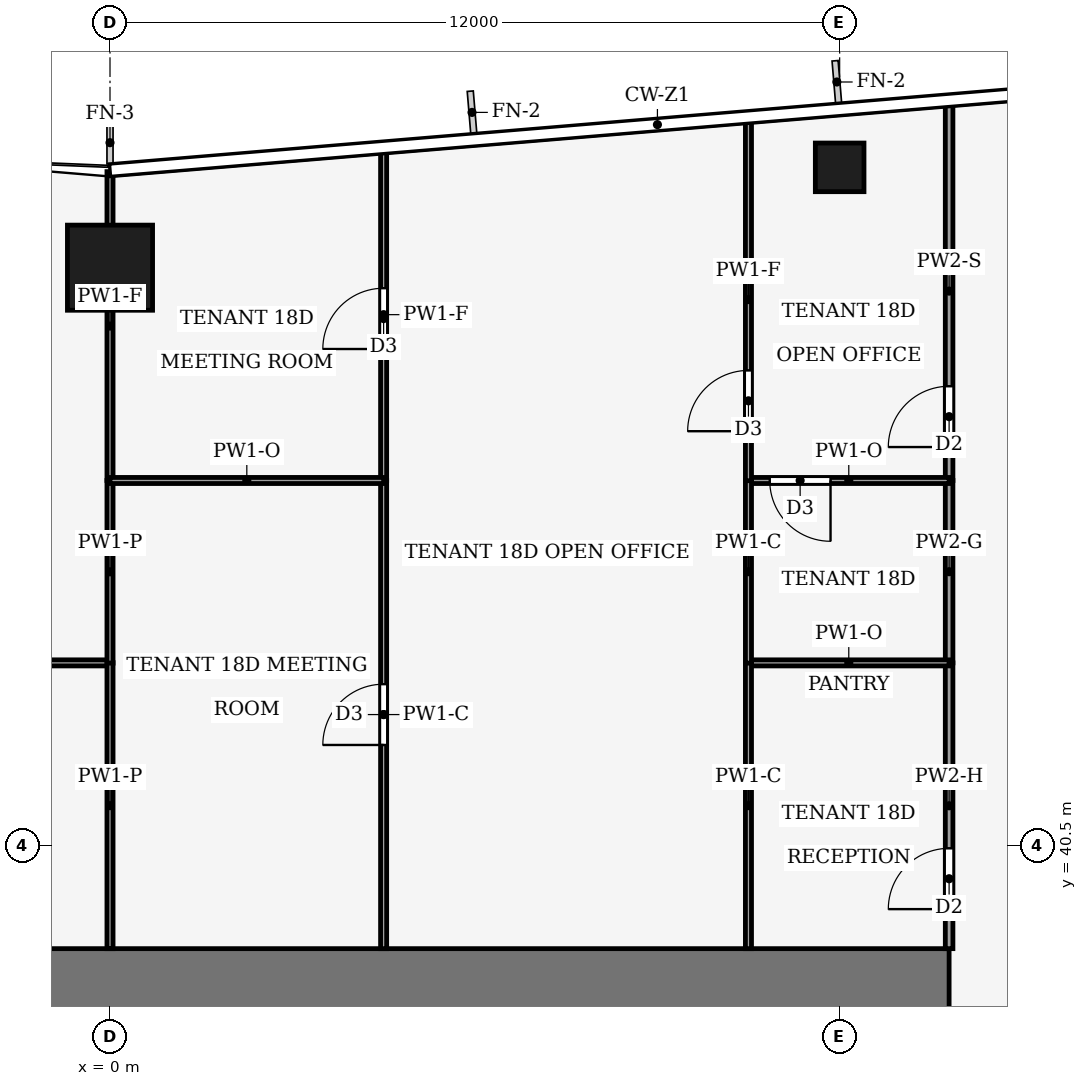
"""IFC4 building model, lengths in metres.
Left out: names, types, materials, properties, quantities, classifications, styles, units other than length and angle.
Written with IfcOpenShell. Run it as: python <this file> out.ifc"""

import sys

from ifc_helpers import new_model, si_unit, direction, frame, frame_2d, origin, origin_2d, place, context, subcontext, project, spatial, rectangle, hollow_rectangle, extrude, element, fill, save


model = new_model("IFC4")
c1 = context("Model", 3, precision=1e-05, world=origin(), true_north=direction((0.0, 1.0)))
c2 = subcontext(c1, "Body", "Model", "MODEL_VIEW")
j1 = project(units=[si_unit("LENGTHUNIT", "METRE"), si_unit("PLANEANGLEUNIT", "RADIAN")], contexts=[c1])
p1 = place(None, origin())
s1 = spatial("IfcSite", under=j1, at=p1, CompositionType="ELEMENT")
p2 = place(p1, origin())
s2 = spatial("IfcBuilding", under=s1, at=p2, CompositionType="ELEMENT")
p3 = place(p2, frame((0.0, 0.0, 82.0)))
s3 = spatial("IfcBuildingStorey", under=s2, at=p3, CompositionType="ELEMENT", Elevation=82.0)
p4 = place(p3, frame((-13.8, 38.2, -0.13), z_axis=(0.0, 0.0, 1.0), x_axis=(1.0, 0.0, 0.0)))
e1 = element("IfcWall", 1, at=p4, inside=s3, PredefinedType="SHEAR", context=c2, shape_type="SweptSolid", body=[
    extrude(rectangle(XDim=27.6, YDim=1.2, at=frame_2d((13.8, 0.0))), origin(), (0.0, 0.0, 1.0), 4.0),
])
p5 = place(p3, frame((0.0, 50.0, 0.0), z_axis=(0.0, 0.0, 1.0), x_axis=(1.0, 0.0, 0.0)))
e2 = element("IfcColumn", 2, at=p5, inside=s3, PredefinedType="COLUMN", context=c2, shape_type="SweptSolid", body=[
    extrude(hollow_rectangle(XDim=1.4, YDim=1.4, WallThickness=0.08, at=origin_2d()), origin(), (0.0, 0.0, 1.0), 4.0),
])
p6 = place(p3, frame((12.0, 51.65, 0.0), z_axis=(0.0, 0.0, 1.0), x_axis=(1.0, 0.0, 0.0)))
e3 = element("IfcColumn", 3, at=p6, inside=s3, PredefinedType="COLUMN", context=c2, shape_type="SweptSolid", body=[
    extrude(hollow_rectangle(XDim=0.8, YDim=0.8, WallThickness=0.04, at=origin_2d()), origin(), (0.0, 0.0, 1.0), 4.0),
])
p7 = place(p3, frame((13.8, 38.8, 0.0), z_axis=(0.0, 0.0, 1.0), x_axis=(0.0, 1.0, 0.0)))
e4 = element("IfcWall", 4, at=p7, inside=s3, PredefinedType="PARTITIONING", context=c2, shape_type="SweptSolid", body=[
    extrude(rectangle(XDim=4.7, YDim=0.125, at=frame_2d((2.35, 0.0))), origin(), (0.0, 0.0, 1.0), 3.14),
])
p8 = place(p7, frame((0.65, 0.0, 0.0)))
e5 = element("IfcOpeningElement", 5, at=p8, cuts=e4, PredefinedType="OPENING", context=c2, shape_type="SweptSolid", body=[
    extrude(rectangle(XDim=1.0, YDim=2.1, at=frame_2d((0.5, 1.05))), frame((0.0, 0.073, 0.0), z_axis=(0.0, -1.0, 0.0), x_axis=(1.0, 0.0, 0.0)), (0.0, 0.0, 1.0), 0.145),
])
p9 = place(p3, frame((13.8, 46.5, 0.0), z_axis=(0.0, 0.0, 1.0), x_axis=(0.0, -1.0, 0.0)))
e6 = element("IfcWall", 6, at=p9, inside=s3, PredefinedType="PARTITIONING", context=c2, shape_type="SweptSolid", body=[
    extrude(rectangle(XDim=3.0, YDim=0.125, at=frame_2d((1.5, 0.0))), origin(), (0.0, 0.0, 1.0), 3.87),
])
p10 = place(p3, frame((13.8, 46.5, 0.0), z_axis=(0.0, 0.0, 1.0), x_axis=(0.0, 1.0, 0.0)))
e7 = element("IfcWall", 7, at=p10, inside=s3, PredefinedType="PARTITIONING", context=c2, shape_type="SweptSolid", body=[
    extrude(rectangle(XDim=6.23, YDim=0.125, at=frame_2d((3.115, 0.0))), origin(), (0.0, 0.0, 1.0), 3.04),
])
p11 = place(p10, frame((0.55, 0.0, 0.0)))
e8 = element("IfcOpeningElement", 8, at=p11, cuts=e7, PredefinedType="OPENING", context=c2, shape_type="SweptSolid", body=[
    extrude(rectangle(XDim=1.0, YDim=2.1, at=frame_2d((0.5, 1.05))), frame((0.0, 0.073, 0.0), z_axis=(0.0, -1.0, 0.0), x_axis=(1.0, 0.0, 0.0)), (0.0, 0.0, 1.0), 0.145),
])
p12 = place(p3, frame((0.0, 43.5, 0.0), z_axis=(0.0, 0.0, 1.0), x_axis=(-1.0, 0.0, 0.0)))
e9 = element("IfcWall", 9, at=p12, inside=s3, PredefinedType="PARTITIONING", context=c2, shape_type="SweptSolid", body=[
    extrude(rectangle(XDim=10.5, YDim=0.1, at=frame_2d((5.25, 0.0))), origin(), (0.0, 0.0, 1.0), 3.39),
])
p13 = place(p12, frame((4.75, 0.0, 0.0)))
e10 = element("IfcOpeningElement", 10, at=p13, cuts=e9, PredefinedType="OPENING", context=c2, shape_type="SweptSolid", body=[
    extrude(rectangle(XDim=1.0, YDim=2.1, at=frame_2d((0.5, 1.05))), frame((0.0, 0.06, 0.0), z_axis=(0.0, -1.0, 0.0), x_axis=(1.0, 0.0, 0.0)), (0.0, 0.0, 1.0), 0.12),
])
p14 = place(p3, frame((0.0, 38.8, 0.0), z_axis=(0.0, 0.0, 1.0), x_axis=(0.0, 1.0, 0.0)))
e11 = element("IfcWall", 11, at=p14, inside=s3, PredefinedType="PARTITIONING", context=c2, shape_type="SweptSolid", body=[
    extrude(rectangle(XDim=4.704, YDim=0.1, at=frame_2d((2.352, 0.0))), origin(), (0.0, 0.0, 1.0), 3.44),
])
p15 = place(p3, frame((0.0, 43.496, 0.0), z_axis=(0.0, 0.0, 1.0), x_axis=(0.0, 1.0, 0.0)))
e12 = element("IfcWall", 12, at=p15, inside=s3, PredefinedType="PARTITIONING", context=c2, shape_type="SweptSolid", body=[
    extrude(rectangle(XDim=3.004, YDim=0.1, at=frame_2d((1.502, 0.0))), origin(), (0.0, 0.0, 1.0), 3.44),
])
p16 = place(p3, frame((0.0, 46.5, 0.0), z_axis=(0.0, 0.0, 1.0), x_axis=(0.0, 1.0, 0.0)))
e13 = element("IfcWall", 13, at=p16, inside=s3, PredefinedType="PARTITIONING", context=c2, shape_type="SweptSolid", body=[
    extrude(rectangle(XDim=5.08, YDim=0.1, at=frame_2d((2.54, 0.0))), origin(), (0.0, 0.0, 1.0), 3.04),
])
p17 = place(p3, frame((13.8, 43.5, 0.0), z_axis=(0.0, 0.0, 1.0), x_axis=(-1.0, 0.0, 0.0)))
e14 = element("IfcWall", 14, at=p17, inside=s3, PredefinedType="PARTITIONING", context=c2, shape_type="SweptSolid", body=[
    extrude(rectangle(XDim=3.3, YDim=0.1, at=frame_2d((1.65, 0.0))), origin(), (0.0, 0.0, 1.0), 3.39),
])
p18 = place(p3, frame((10.5, 43.504, 0.0), z_axis=(0.0, 0.0, 1.0), x_axis=(0.0, -1.0, 0.0)))
e15 = element("IfcWall", 15, at=p18, inside=s3, PredefinedType="PARTITIONING", context=c2, shape_type="SweptSolid", body=[
    extrude(rectangle(XDim=4.704, YDim=0.1, at=frame_2d((2.352, 0.0))), origin(), (0.0, 0.0, 1.0), 3.87),
])
p19 = place(p3, frame((13.8, 46.5, 0.0), z_axis=(0.0, 0.0, 1.0), x_axis=(-1.0, 0.0, 0.0)))
e16 = element("IfcWall", 16, at=p19, inside=s3, PredefinedType="PARTITIONING", context=c2, shape_type="SweptSolid", body=[
    extrude(rectangle(XDim=3.3, YDim=0.1, at=frame_2d((1.65, 0.0))), origin(), (0.0, 0.0, 1.0), 3.39),
])
p20 = place(p19, frame((1.95, 0.0, 0.0)))
e17 = element("IfcOpeningElement", 17, at=p20, cuts=e16, PredefinedType="OPENING", context=c2, shape_type="SweptSolid", body=[
    extrude(rectangle(XDim=1.0, YDim=2.1, at=frame_2d((0.5, 1.05))), frame((0.0, 0.06, 0.0), z_axis=(0.0, -1.0, 0.0), x_axis=(1.0, 0.0, 0.0)), (0.0, 0.0, 1.0), 0.12),
])
p21 = place(p3, frame((10.5, 46.504, 0.0), z_axis=(0.0, 0.0, 1.0), x_axis=(0.0, -1.0, 0.0)))
e18 = element("IfcWall", 18, at=p21, inside=s3, PredefinedType="PARTITIONING", context=c2, shape_type="SweptSolid", body=[
    extrude(rectangle(XDim=3.008, YDim=0.1, at=frame_2d((1.504, 0.0))), origin(), (0.0, 0.0, 1.0), 3.87),
])
p22 = place(p3, frame((10.5, 46.496, 0.0), z_axis=(0.0, 0.0, 1.0), x_axis=(0.0, 1.0, 0.0)))
e19 = element("IfcWall", 19, at=p22, inside=s3, PredefinedType="PARTITIONING", context=c2, shape_type="SweptSolid", body=[
    extrude(rectangle(XDim=5.959, YDim=0.1, at=frame_2d((2.979, 0.0))), origin(), (0.0, 0.0, 1.0), 3.04),
])
p23 = place(p22, frame((0.814, 0.0, 0.0)))
e20 = element("IfcOpeningElement", 20, at=p23, cuts=e19, PredefinedType="OPENING", context=c2, shape_type="SweptSolid", body=[
    extrude(rectangle(XDim=1.0, YDim=2.1, at=frame_2d((0.5, 1.05))), frame((0.0, 0.06, 0.0), z_axis=(0.0, -1.0, 0.0), x_axis=(1.0, 0.0, 0.0)), (0.0, 0.0, 1.0), 0.12),
])
p24 = place(p3, frame((4.5, 38.8, 0.0), z_axis=(0.0, 0.0, 1.0), x_axis=(0.0, 1.0, 0.0)))
e21 = element("IfcWall", 21, at=p24, inside=s3, PredefinedType="PARTITIONING", context=c2, shape_type="SweptSolid", body=[
    extrude(rectangle(XDim=7.7, YDim=0.1, at=frame_2d((3.85, 0.0))), origin(), (0.0, 0.0, 1.0), 3.87),
])
p25 = place(p24, frame((3.35, 0.0, 0.0)))
e22 = element("IfcOpeningElement", 22, at=p25, cuts=e21, PredefinedType="OPENING", context=c2, shape_type="SweptSolid", body=[
    extrude(rectangle(XDim=1.0, YDim=2.1, at=frame_2d((0.5, 1.05))), frame((0.0, 0.06, 0.0), z_axis=(0.0, -1.0, 0.0), x_axis=(1.0, 0.0, 0.0)), (0.0, 0.0, 1.0), 0.12),
])
p26 = place(p3, frame((4.5, 46.5, 0.0), z_axis=(0.0, 0.0, 1.0), x_axis=(0.0, 1.0, 0.0)))
e23 = element("IfcWall", 23, at=p26, inside=s3, PredefinedType="PARTITIONING", context=c2, shape_type="SweptSolid", body=[
    extrude(rectangle(XDim=5.455, YDim=0.1, at=frame_2d((2.728, 0.0))), origin(), (0.0, 0.0, 1.0), 3.04),
])
p27 = place(p26, frame((2.162, 0.0, 0.0)))
e24 = element("IfcOpeningElement", 24, at=p27, cuts=e23, PredefinedType="OPENING", context=c2, shape_type="SweptSolid", body=[
    extrude(rectangle(XDim=1.0, YDim=2.1, at=frame_2d((0.5, 1.05))), frame((0.0, 0.06, 0.0), z_axis=(0.0, -1.0, 0.0), x_axis=(1.0, 0.0, 0.0)), (0.0, 0.0, 1.0), 0.12),
])
p28 = place(p3, frame((4.5, 46.5, 0.0), z_axis=(0.0, 0.0, 1.0), x_axis=(-1.0, 0.0, 0.0)))
e25 = element("IfcWall", 25, at=p28, inside=s3, PredefinedType="PARTITIONING", context=c2, shape_type="SweptSolid", body=[
    extrude(rectangle(XDim=4.5, YDim=0.1, at=frame_2d((2.25, 0.0))), origin(), (0.0, 0.0, 1.0), 3.39),
])
p29 = place(p8, origin())
e26 = element("IfcDoor", 26, at=p29, inside=s3, OperationType="SINGLE_SWING_LEFT", PredefinedType="DOOR", context=c2, shape_type="SweptSolid", body=[
    extrude(rectangle(XDim=1.0, YDim=2.1, at=frame_2d((0.5, 1.05))), frame((0.0, 0.025, 0.0), z_axis=(0.0, -1.0, 0.0), x_axis=(1.0, 0.0, 0.0)), (0.0, 0.0, 1.0), 0.05),
])
fill(e5, e26)
p30 = place(p11, origin())
e27 = element("IfcDoor", 27, at=p30, inside=s3, OperationType="SINGLE_SWING_LEFT", PredefinedType="DOOR", context=c2, shape_type="SweptSolid", body=[
    extrude(rectangle(XDim=1.0, YDim=2.1, at=frame_2d((0.5, 1.05))), frame((0.0, 0.025, 0.0), z_axis=(0.0, -1.0, 0.0), x_axis=(1.0, 0.0, 0.0)), (0.0, 0.0, 1.0), 0.05),
])
fill(e8, e27)
p31 = place(p20, origin())
e28 = element("IfcDoor", 28, at=p31, inside=s3, OperationType="SINGLE_SWING_RIGHT", PredefinedType="DOOR", context=c2, shape_type="SweptSolid", body=[
    extrude(rectangle(XDim=1.0, YDim=2.1, at=frame_2d((0.5, 1.05))), frame((0.0, 0.025, 0.0), z_axis=(0.0, -1.0, 0.0), x_axis=(1.0, 0.0, 0.0)), (0.0, 0.0, 1.0), 0.05),
])
fill(e17, e28)
p32 = place(p23, origin())
e29 = element("IfcDoor", 29, at=p32, inside=s3, OperationType="SINGLE_SWING_LEFT", PredefinedType="DOOR", context=c2, shape_type="SweptSolid", body=[
    extrude(rectangle(XDim=1.0, YDim=2.1, at=frame_2d((0.5, 1.05))), frame((0.0, 0.025, 0.0), z_axis=(0.0, -1.0, 0.0), x_axis=(1.0, 0.0, 0.0)), (0.0, 0.0, 1.0), 0.05),
])
fill(e20, e29)
p33 = place(p25, origin())
e30 = element("IfcDoor", 30, at=p33, inside=s3, OperationType="SINGLE_SWING_LEFT", PredefinedType="DOOR", context=c2, shape_type="SweptSolid", body=[
    extrude(rectangle(XDim=1.0, YDim=2.1, at=frame_2d((0.5, 1.05))), frame((0.0, 0.025, 0.0), z_axis=(0.0, -1.0, 0.0), x_axis=(1.0, 0.0, 0.0)), (0.0, 0.0, 1.0), 0.05),
])
fill(e22, e30)
p34 = place(p27, origin())
e31 = element("IfcDoor", 31, at=p34, inside=s3, OperationType="SINGLE_SWING_LEFT", PredefinedType="DOOR", context=c2, shape_type="SweptSolid", body=[
    extrude(rectangle(XDim=1.0, YDim=2.1, at=frame_2d((0.5, 1.05))), frame((0.0, 0.025, 0.0), z_axis=(0.0, -1.0, 0.0), x_axis=(1.0, 0.0, 0.0)), (0.0, 0.0, 1.0), 0.05),
])
fill(e24, e31)
save(model, sys.argv[1])
